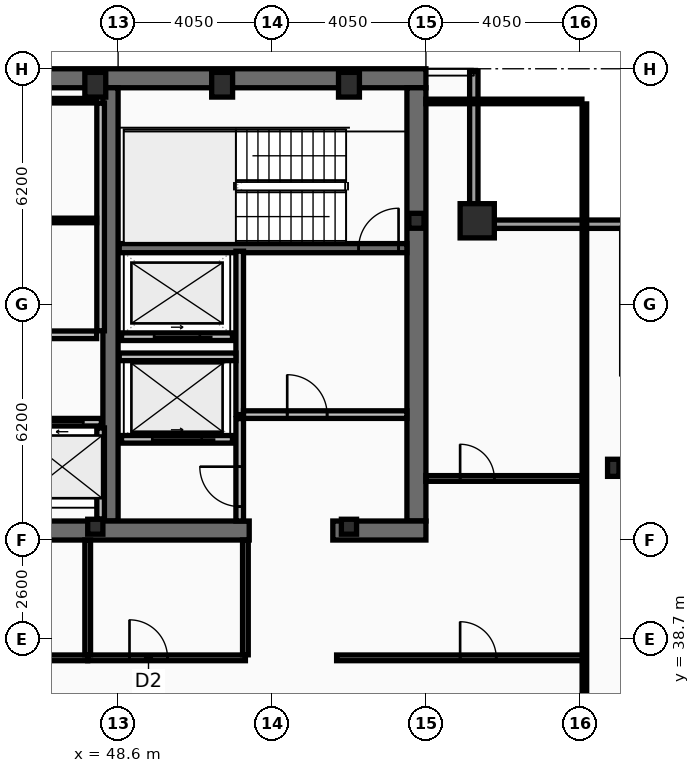
"""IFC4 building model, lengths in metres.
Left out: names, types, materials, properties, quantities, classifications, styles, units other than length and angle.
Written with IfcOpenShell. Run it as: python <this file> out.ifc"""

import sys

from ifc_helpers import new_model, si_unit, direction, frame, frame_2d, origin, origin_2d, place, context, subcontext, project, spatial, rectangle, hollow_rectangle, i_section, extrude, element, fill, save


model = new_model("IFC4")
c1 = context("Model", 3, precision=1e-05, world=origin(), true_north=direction((0.0, 1.0)))
c2 = subcontext(c1, "Body", "Model", "MODEL_VIEW")
j1 = project(units=[si_unit("LENGTHUNIT", "METRE"), si_unit("PLANEANGLEUNIT", "RADIAN")], contexts=[c1])
p1 = place(None, origin())
s1 = spatial("IfcSite", under=j1, at=p1, CompositionType="ELEMENT")
p2 = place(p1, origin())
s2 = spatial("IfcBuilding", under=s1, at=p2, CompositionType="ELEMENT")
p3 = place(p2, frame((0.0, 0.0, 332.6)))
s3 = spatial("IfcBuildingStorey", under=s2, at=p3, CompositionType="ELEMENT", Elevation=332.6)
p4 = place(p3, frame((16.2, 53.45, 0.0), z_axis=(0.0, 0.0, 1.0), x_axis=(1.0, 0.0, 0.0)))
e1 = element("IfcWall", 1, at=p4, inside=s3, PredefinedType="SHEAR", context=c2, shape_type="SweptSolid", body=[
    extrude(rectangle(XDim=40.5, YDim=0.5, at=frame_2d((20.25, 0.0))), origin(), (0.0, 0.0, 1.0), 3.44),
])
p5 = place(p3, frame((56.45, 53.2, 0.0), z_axis=(0.0, 0.0, 1.0), x_axis=(0.0, -1.0, 0.0)))
e2 = element("IfcWall", 2, at=p5, inside=s3, PredefinedType="SHEAR", context=c2, shape_type="SweptSolid", body=[
    extrude(rectangle(XDim=11.4, YDim=0.5, at=frame_2d((5.7, 0.0))), origin(), (0.0, 0.0, 1.0), 3.44),
])
p6 = place(p3, frame((48.4, 41.8, 0.0), z_axis=(0.0, 0.0, 1.0), x_axis=(0.0, 1.0, 0.0)))
e3 = element("IfcWall", 3, at=p6, inside=s3, PredefinedType="SHEAR", context=c2, shape_type="SweptSolid", body=[
    extrude(rectangle(XDim=11.4, YDim=0.4, at=frame_2d((5.7, 0.0))), origin(), (0.0, 0.0, 1.0), 3.44),
])
p7 = place(p3, frame((52.05, 41.55, 0.0), z_axis=(0.0, 0.0, 1.0), x_axis=(-1.0, 0.0, 0.0)))
e4 = element("IfcWall", 4, at=p7, inside=s3, PredefinedType="SHEAR", context=c2, shape_type="SweptSolid", body=[
    extrude(rectangle(XDim=11.3, YDim=0.5, at=frame_2d((5.65, 0.0))), origin(), (0.0, 0.0, 1.0), 3.44),
])
p8 = place(p3, frame((56.7, 41.55, 0.0), z_axis=(0.0, 0.0, 1.0), x_axis=(-1.0, 0.0, 0.0)))
e5 = element("IfcWall", 5, at=p8, inside=s3, PredefinedType="SHEAR", context=c2, shape_type="SweptSolid", body=[
    extrude(rectangle(XDim=2.45, YDim=0.5, at=frame_2d((1.225, 0.0))), origin(), (0.0, 0.0, 1.0), 3.44),
])
p9 = place(p3, frame((48.63, 48.98, 0.0), z_axis=(0.0, 0.0, 1.0), x_axis=(1.0, 0.0, 0.0)))
e6 = element("IfcWall", 6, at=p9, inside=s3, PredefinedType="SHEAR", context=c2, shape_type="SweptSolid", body=[
    extrude(rectangle(XDim=7.57, YDim=0.24, at=frame_2d((3.785, 0.0))), origin(), (0.0, 0.0, 1.0), 3.44),
])
p10 = place(p9, frame((6.3, 0.0, 0.0)))
e7 = element("IfcOpeningElement", 7, at=p10, cuts=e6, PredefinedType="OPENING", context=c2, shape_type="SweptSolid", body=[
    extrude(rectangle(XDim=1.05, YDim=2.15, at=frame_2d((0.525, 1.075))), frame((0.0, 0.13, 0.0), z_axis=(0.0, -1.0, 0.0), x_axis=(1.0, 0.0, 0.0)), (0.0, 0.0, 1.0), 0.26),
])
p11 = place(p3, frame((58.05, 49.7, 0.0), z_axis=(0.0, 0.0, 1.0), x_axis=(1.0, 0.0, 0.0)))
e8 = element("IfcColumn", 8, at=p11, inside=s3, PredefinedType="COLUMN", context=c2, shape_type="SweptSolid", body=[
    extrude(hollow_rectangle(XDim=0.9, YDim=0.9, WallThickness=0.05, at=origin_2d()), origin(), (0.0, 0.0, 1.0), 3.6),
])
for number, where, z_axis, x_axis in (
    (9, (48.0, 53.28, 0.0), (0.0, 0.0, 1.0), (1.0, 0.0, 0.0)),
    (10, (51.337, 53.28, 0.0), (0.0, 0.0, 1.0), (1.0, 0.0, 0.0)),
    (11, (54.675, 53.28, 0.0), (0.0, 0.0, 1.0), (1.0, 0.0, 0.0)),
):
    element("IfcColumn", number, at=place(p3, frame(where, z_axis=z_axis, x_axis=x_axis)), inside=s3, PredefinedType="COLUMN", context=c2, shape_type="SweptSolid", body=[
        extrude(hollow_rectangle(XDim=0.55, YDim=0.65, WallThickness=0.04, at=origin_2d()), origin(), (0.0, 0.0, 1.0), 3.6),
    ])
p12 = place(p3, frame((61.63, 43.2, 0.0), z_axis=(0.0, 0.0, 1.0), x_axis=(1.0, 0.0, 0.0)))
e12 = element("IfcColumn", 12, at=p12, inside=s3, PredefinedType="COLUMN", context=c2, shape_type="SweptSolid", body=[
    extrude(i_section(OverallWidth=0.3, OverallDepth=0.45, WebThickness=0.014, FlangeThickness=0.026, at=origin_2d()), origin(), (0.0, 0.0, 1.0), 3.6),
])
for number, where, z_axis, x_axis in (
    (13, (56.45, 49.7, 0.0), (0.0, 0.0, 1.0), (1.0, 0.0, 0.0)),
    (14, (48.0, 41.65, 0.0), (0.0, 0.0, 1.0), (1.0, 0.0, 0.0)),
    (15, (54.675, 41.65, 0.0), (0.0, 0.0, 1.0), (1.0, 0.0, 0.0)),
):
    element("IfcColumn", number, at=place(p3, frame(where, z_axis=z_axis, x_axis=x_axis)), inside=s3, PredefinedType="COLUMN", context=c2, shape_type="SweptSolid", body=[
        extrude(i_section(OverallWidth=0.399, OverallDepth=0.393, WebThickness=0.023, FlangeThickness=0.037, at=origin_2d()), origin(), (0.0, 0.0, 1.0), 3.6),
    ])
p13 = place(p3, frame((57.96, 53.63, 0.0), z_axis=(0.0, 0.0, 1.0), x_axis=(0.0, -1.0, 0.0)))
e16 = element("IfcWall", 16, at=p13, inside=s3, PredefinedType="SOLIDWALL", context=c2, shape_type="SweptSolid", body=[
    extrude(rectangle(XDim=3.91, YDim=0.22, at=frame_2d((1.955, 0.0))), origin(), (0.0, 0.0, 1.0), 2.88),
])
p14 = place(p3, frame((57.85, 49.61, 0.0), z_axis=(0.0, 0.0, 1.0), x_axis=(1.0, 0.0, 0.0)))
e17 = element("IfcWall", 17, at=p14, inside=s3, PredefinedType="SOLIDWALL", context=c2, shape_type="SweptSolid", body=[
    extrude(rectangle(XDim=4.22, YDim=0.22, at=frame_2d((2.11, 0.0))), origin(), (0.0, 0.0, 1.0), 2.88),
])
p15 = place(p3, frame((41.68, 44.4, 0.0), z_axis=(0.0, 0.0, 1.0), x_axis=(1.0, 0.0, 0.0)))
e18 = element("IfcWall", 18, at=p15, inside=s3, PredefinedType="PARTITIONING", context=c2, shape_type="SweptSolid", body=[
    extrude(rectangle(XDim=6.48, YDim=0.2, at=frame_2d((3.24, 0.0))), origin(), (0.0, 0.0, 1.0), 3.44),
])
p16 = place(p15, frame((0.58, 0.0, 0.0)))
e19 = element("IfcOpeningElement", 19, at=p16, cuts=e18, PredefinedType="OPENING", context=c2, shape_type="SweptSolid", body=[
    extrude(rectangle(XDim=1.1, YDim=2.18, at=frame_2d((0.55, 1.09))), frame((0.0, 0.11, 0.0), z_axis=(0.0, -1.0, 0.0), x_axis=(1.0, 0.0, 0.0)), (0.0, 0.0, 1.0), 0.22),
])
p17 = place(p15, frame((2.74, 0.0, 0.0)))
e20 = element("IfcOpeningElement", 20, at=p17, cuts=e18, PredefinedType="OPENING", context=c2, shape_type="SweptSolid", body=[
    extrude(rectangle(XDim=1.1, YDim=2.18, at=frame_2d((0.55, 1.09))), frame((0.0, 0.11, 0.0), z_axis=(0.0, -1.0, 0.0), x_axis=(1.0, 0.0, 0.0)), (0.0, 0.0, 1.0), 0.22),
])
p18 = place(p15, frame((4.9, 0.0, 0.0)))
e21 = element("IfcOpeningElement", 21, at=p18, cuts=e18, PredefinedType="OPENING", context=c2, shape_type="SweptSolid", body=[
    extrude(rectangle(XDim=1.1, YDim=2.18, at=frame_2d((0.55, 1.09))), frame((0.0, 0.11, 0.0), z_axis=(0.0, -1.0, 0.0), x_axis=(1.0, 0.0, 0.0)), (0.0, 0.0, 1.0), 0.22),
])
p19 = place(p3, frame((51.61, 43.95, 0.0), z_axis=(0.0, 0.0, 1.0), x_axis=(-1.0, 0.0, 0.0)))
e22 = element("IfcWall", 22, at=p19, inside=s3, PredefinedType="PARTITIONING", context=c2, shape_type="SweptSolid", body=[
    extrude(rectangle(XDim=2.92, YDim=0.2, at=frame_2d((1.46, 0.0))), origin(), (0.0, 0.0, 1.0), 3.44),
])
p20 = place(p19, frame((0.81, 0.0, 0.0)))
e23 = element("IfcOpeningElement", 23, at=p20, cuts=e22, PredefinedType="OPENING", context=c2, shape_type="SweptSolid", body=[
    extrude(rectangle(XDim=1.3, YDim=2.18, at=frame_2d((0.65, 1.09))), frame((0.0, 0.11, 0.0), z_axis=(0.0, -1.0, 0.0), x_axis=(1.0, 0.0, 0.0)), (0.0, 0.0, 1.0), 0.22),
])
p21 = place(p3, frame((51.61, 46.65, 0.0), z_axis=(0.0, 0.0, 1.0), x_axis=(-1.0, 0.0, 0.0)))
e24 = element("IfcWall", 24, at=p21, inside=s3, PredefinedType="PARTITIONING", context=c2, shape_type="SweptSolid", body=[
    extrude(rectangle(XDim=2.92, YDim=0.2, at=frame_2d((1.46, 0.0))), origin(), (0.0, 0.0, 1.0), 3.44),
])
p22 = place(p21, frame((0.86, 0.0, 0.0)))
e25 = element("IfcOpeningElement", 25, at=p22, cuts=e24, PredefinedType="OPENING", context=c2, shape_type="SweptSolid", body=[
    extrude(rectangle(XDim=1.2, YDim=2.18, at=frame_2d((0.6, 1.09))), frame((0.0, 0.11, 0.0), z_axis=(0.0, -1.0, 0.0), x_axis=(1.0, 0.0, 0.0)), (0.0, 0.0, 1.0), 0.22),
])
p23 = place(p3, frame((51.8, 44.6, 0.0), z_axis=(0.0, 0.0, 1.0), x_axis=(0.0, 1.0, 0.0)))
e26 = element("IfcWall", 26, at=p23, inside=s3, PredefinedType="PARTITIONING", context=c2, shape_type="SweptSolid", body=[
    extrude(rectangle(XDim=4.3, YDim=0.2, at=frame_2d((2.15, 0.0))), origin(), (0.0, 0.0, 1.0), 3.44),
])
p24 = place(p3, frame((51.9, 44.6, 0.0), z_axis=(0.0, 0.0, 1.0), x_axis=(1.0, 0.0, 0.0)))
e27 = element("IfcWall", 27, at=p24, inside=s3, PredefinedType="PARTITIONING", context=c2, shape_type="SweptSolid", body=[
    extrude(rectangle(XDim=4.3, YDim=0.2, at=frame_2d((2.15, 0.0))), origin(), (0.0, 0.0, 1.0), 3.44),
])
p25 = place(p24, frame((1.15, 0.0, 0.0)))
e28 = element("IfcOpeningElement", 28, at=p25, cuts=e27, PredefinedType="OPENING", context=c2, shape_type="SweptSolid", body=[
    extrude(rectangle(XDim=1.05, YDim=2.15, at=frame_2d((0.525, 1.075))), frame((0.0, 0.11, 0.0), z_axis=(0.0, -1.0, 0.0), x_axis=(1.0, 0.0, 0.0)), (0.0, 0.0, 1.0), 0.22),
])
p26 = place(p3, frame((48.63, 46.12, 0.0), z_axis=(0.0, 0.0, 1.0), x_axis=(1.0, 0.0, 0.0)))
e29 = element("IfcWall", 29, at=p26, inside=s3, PredefinedType="PARTITIONING", context=c2, shape_type="SweptSolid", body=[
    extrude(rectangle(XDim=3.07, YDim=0.2, at=frame_2d((1.535, 0.0))), origin(), (0.0, 0.0, 1.0), 3.44),
])
p27 = place(p3, frame((51.8, 41.8, 0.0), z_axis=(0.0, 0.0, 1.0), x_axis=(0.0, 1.0, 0.0)))
e30 = element("IfcWall", 30, at=p27, inside=s3, PredefinedType="PARTITIONING", context=c2, shape_type="SweptSolid", body=[
    extrude(rectangle(XDim=2.695, YDim=0.2, at=frame_2d((1.348, 0.0))), origin(), (0.0, 0.0, 1.0), 3.44),
])
p28 = place(p27, frame((0.38, 0.0, 0.0)))
e31 = element("IfcOpeningElement", 31, at=p28, cuts=e30, PredefinedType="OPENING", context=c2, shape_type="SweptSolid", body=[
    extrude(rectangle(XDim=1.05, YDim=2.15, at=frame_2d((0.525, 1.075))), frame((0.0, 0.11, 0.0), z_axis=(0.0, -1.0, 0.0), x_axis=(1.0, 0.0, 0.0)), (0.0, 0.0, 1.0), 0.22),
])
p29 = place(p3, frame((48.14, 46.805, 0.0), z_axis=(0.0, 0.0, 1.0), x_axis=(0.0, 1.0, 0.0)))
e32 = element("IfcWall", 32, at=p29, inside=s3, PredefinedType="PARTITIONING", context=c2, shape_type="SweptSolid", body=[
    extrude(rectangle(XDim=5.99, YDim=0.2, at=frame_2d((2.995, 0.0))), origin(), (0.0, 0.0, 1.0), 3.44),
])
p30 = place(p3, frame((40.685, 52.86, 0.0), z_axis=(0.0, 0.0, 1.0), x_axis=(1.0, 0.0, 0.0)))
e33 = element("IfcWall", 33, at=p30, inside=s3, PredefinedType="PARTITIONING", context=c2, shape_type="SweptSolid", body=[
    extrude(rectangle(XDim=7.35, YDim=0.12, at=frame_2d((3.675, 0.0))), origin(), (0.0, 0.0, 1.0), 3.44),
])
p31 = place(p3, frame((40.685, 49.709, 0.0), z_axis=(0.0, 0.0, 1.0), x_axis=(1.0, 0.0, 0.0)))
e34 = element("IfcWall", 34, at=p31, inside=s3, PredefinedType="PARTITIONING", context=c2, shape_type="SweptSolid", body=[
    extrude(rectangle(XDim=7.35, YDim=0.12, at=frame_2d((3.675, 0.0))), origin(), (0.0, 0.0, 1.0), 3.44),
])
p32 = place(p31, frame((2.4, 0.0, 0.0)))
e35 = element("IfcOpeningElement", 35, at=p32, cuts=e34, PredefinedType="OPENING", context=c2, shape_type="SweptSolid", body=[
    extrude(rectangle(XDim=0.9, YDim=2.05, at=frame_2d((0.45, 1.025))), frame((0.0, 0.07, 0.0), z_axis=(0.0, -1.0, 0.0), x_axis=(1.0, 0.0, 0.0)), (0.0, 0.0, 1.0), 0.14),
])
p33 = place(p3, frame((40.685, 46.7, 0.0), z_axis=(0.0, 0.0, 1.0), x_axis=(1.0, 0.0, 0.0)))
e36 = element("IfcWall", 36, at=p33, inside=s3, PredefinedType="PARTITIONING", context=c2, shape_type="SweptSolid", body=[
    extrude(rectangle(XDim=7.35, YDim=0.2, at=frame_2d((3.675, 0.0))), origin(), (0.0, 0.0, 1.0), 3.44),
])
p34 = place(p33, frame((2.4, 0.0, 0.0)))
e37 = element("IfcOpeningElement", 37, at=p34, cuts=e36, PredefinedType="OPENING", context=c2, shape_type="SweptSolid", body=[
    extrude(rectangle(XDim=0.95, YDim=2.1, at=frame_2d((0.475, 1.05))), frame((0.0, 0.11, 0.0), z_axis=(0.0, -1.0, 0.0), x_axis=(1.0, 0.0, 0.0)), (0.0, 0.0, 1.0), 0.22),
])
p35 = place(p3, frame((48.14, 41.85, 0.0), z_axis=(0.0, 0.0, 1.0), x_axis=(0.0, 1.0, 0.0)))
e38 = element("IfcWall", 38, at=p35, inside=s3, PredefinedType="PARTITIONING", context=c2, shape_type="SweptSolid", body=[
    extrude(rectangle(XDim=2.4, YDim=0.2, at=frame_2d((1.2, 0.0))), origin(), (0.0, 0.0, 1.0), 3.44),
])
p36 = place(p3, frame((40.88, 38.2, 0.0), z_axis=(0.0, 0.0, 1.0), x_axis=(1.0, 0.0, 0.0)))
e39 = element("IfcWall", 39, at=p36, inside=s3, PredefinedType="PARTITIONING", context=c2, shape_type="SweptSolid", body=[
    extrude(rectangle(XDim=6.92, YDim=0.15, at=frame_2d((3.46, 0.0))), origin(), (0.0, 0.0, 1.0), 2.83),
])
p37 = place(p36, frame((1.1, 0.0, 0.0)))
e40 = element("IfcOpeningElement", 40, at=p37, cuts=e39, PredefinedType="OPENING", context=c2, shape_type="SweptSolid", body=[
    extrude(rectangle(XDim=0.9, YDim=2.05, at=frame_2d((0.45, 1.025))), frame((0.0, 0.085, 0.0), z_axis=(0.0, -1.0, 0.0), x_axis=(1.0, 0.0, 0.0)), (0.0, 0.0, 1.0), 0.17),
])
p38 = place(p3, frame((47.8, 38.2, 0.0), z_axis=(0.0, 0.0, 1.0), x_axis=(1.0, 0.0, 0.0)))
e41 = element("IfcWall", 41, at=p38, inside=s3, PredefinedType="PARTITIONING", context=c2, shape_type="SweptSolid", body=[
    extrude(rectangle(XDim=4.15, YDim=0.15, at=frame_2d((2.075, 0.0))), origin(), (0.0, 0.0, 1.0), 2.83),
])
p39 = place(p38, frame((1.1, 0.0, 0.0)))
e42 = element("IfcOpeningElement", 42, at=p39, cuts=e41, PredefinedType="OPENING", context=c2, shape_type="SweptSolid", body=[
    extrude(rectangle(XDim=1.0, YDim=2.05, at=frame_2d((0.5, 1.025))), frame((0.0, 0.085, 0.0), z_axis=(0.0, -1.0, 0.0), x_axis=(1.0, 0.0, 0.0)), (0.0, 0.0, 1.0), 0.17),
])
p40 = place(p3, frame((47.8, 38.28, 0.0), z_axis=(0.0, 0.0, 1.0), x_axis=(0.0, 1.0, 0.0)))
e43 = element("IfcWall", 43, at=p40, inside=s3, PredefinedType="PARTITIONING", context=c2, shape_type="SweptSolid", body=[
    extrude(rectangle(XDim=3.02, YDim=0.15, at=frame_2d((1.51, 0.0))), origin(), (0.0, 0.0, 1.0), 2.83),
])
p41 = place(p3, frame((51.95, 38.28, 0.0), z_axis=(0.0, 0.0, 1.0), x_axis=(0.0, 1.0, 0.0)))
e44 = element("IfcWall", 44, at=p41, inside=s3, PredefinedType="PARTITIONING", context=c2, shape_type="SweptSolid", body=[
    extrude(rectangle(XDim=3.02, YDim=0.15, at=frame_2d((1.51, 0.0))), origin(), (0.0, 0.0, 1.0), 3.44),
])
p42 = place(p3, frame((54.35, 38.2, 0.0), z_axis=(0.0, 0.0, 1.0), x_axis=(1.0, 0.0, 0.0)))
e45 = element("IfcWall", 45, at=p42, inside=s3, PredefinedType="PARTITIONING", context=c2, shape_type="SweptSolid", body=[
    extrude(rectangle(XDim=6.52, YDim=0.15, at=frame_2d((3.26, 0.0))), origin(), (0.0, 0.0, 1.0), 2.83),
])
p43 = place(p42, frame((3.25, 0.0, 0.0)))
e46 = element("IfcOpeningElement", 46, at=p43, cuts=e45, PredefinedType="OPENING", context=c2, shape_type="SweptSolid", body=[
    extrude(rectangle(XDim=0.95, YDim=2.05, at=frame_2d((0.475, 1.025))), frame((0.0, 0.085, 0.0), z_axis=(0.0, -1.0, 0.0), x_axis=(1.0, 0.0, 0.0)), (0.0, 0.0, 1.0), 0.17),
])
p44 = place(p3, frame((56.7, 42.92, 0.0), z_axis=(0.0, 0.0, 1.0), x_axis=(1.0, 0.0, 0.0)))
e47 = element("IfcWall", 47, at=p44, inside=s3, PredefinedType="PARTITIONING", context=c2, shape_type="SweptSolid", body=[
    extrude(rectangle(XDim=4.105, YDim=0.15, at=frame_2d((2.052, 0.0))), origin(), (0.0, 0.0, 1.0), 2.83),
])
p45 = place(p44, frame((0.9, 0.0, 0.0)))
e48 = element("IfcOpeningElement", 48, at=p45, cuts=e47, PredefinedType="OPENING", context=c2, shape_type="SweptSolid", body=[
    extrude(rectangle(XDim=0.9, YDim=2.05, at=frame_2d((0.45, 1.025))), frame((0.0, 0.085, 0.0), z_axis=(0.0, -1.0, 0.0), x_axis=(1.0, 0.0, 0.0)), (0.0, 0.0, 1.0), 0.17),
])
p46 = place(p3, frame((60.87, 10.665, 0.0), z_axis=(0.0, 0.0, 1.0), x_axis=(0.0, 1.0, 0.0)))
e49 = element("IfcWall", 49, at=p46, inside=s3, PredefinedType="PARTITIONING", context=c2, shape_type="SweptSolid", body=[
    extrude(rectangle(XDim=42.11, YDim=0.12, at=frame_2d((21.055, 0.0))), origin(), (0.0, 0.0, 1.0), 2.83),
])
p47 = place(p3, frame((56.7, 52.84, 0.0), z_axis=(0.0, 0.0, 1.0), x_axis=(1.0, 0.0, 0.0)))
e50 = element("IfcWall", 50, at=p47, inside=s3, PredefinedType="PARTITIONING", context=c2, shape_type="SweptSolid", body=[
    extrude(rectangle(XDim=4.105, YDim=0.12, at=frame_2d((2.052, 0.0))), origin(), (0.0, 0.0, 1.0), 3.44),
])
p48 = place(p10, origin())
e51 = element("IfcDoor", 51, at=p48, inside=s3, OperationType="SINGLE_SWING_RIGHT", PredefinedType="DOOR", context=c2, shape_type="SweptSolid", body=[
    extrude(rectangle(XDim=1.05, YDim=2.15, at=frame_2d((0.525, 1.075))), frame((0.0, 0.025, 0.0), z_axis=(0.0, -1.0, 0.0), x_axis=(1.0, 0.0, 0.0)), (0.0, 0.0, 1.0), 0.05),
])
fill(e7, e51)
p49 = place(p18, origin())
e52 = element("IfcDoor", 52, at=p49, inside=s3, OperationType="SLIDING_TO_LEFT", PredefinedType="DOOR", context=c2, shape_type="SweptSolid", body=[
    extrude(rectangle(XDim=1.1, YDim=2.18, at=frame_2d((0.55, 1.09))), frame((0.0, 0.025, 0.0), z_axis=(0.0, -1.0, 0.0), x_axis=(1.0, 0.0, 0.0)), (0.0, 0.0, 1.0), 0.05),
])
fill(e21, e52)
p50 = place(p20, origin())
e53 = element("IfcDoor", 53, at=p50, inside=s3, OperationType="SLIDING_TO_LEFT", PredefinedType="DOOR", context=c2, shape_type="SweptSolid", body=[
    extrude(rectangle(XDim=1.3, YDim=2.18, at=frame_2d((0.65, 1.09))), frame((0.0, 0.025, 0.0), z_axis=(0.0, -1.0, 0.0), x_axis=(1.0, 0.0, 0.0)), (0.0, 0.0, 1.0), 0.05),
])
fill(e23, e53)
p51 = place(p22, origin())
e54 = element("IfcDoor", 54, at=p51, inside=s3, OperationType="SLIDING_TO_LEFT", PredefinedType="DOOR", context=c2, shape_type="SweptSolid", body=[
    extrude(rectangle(XDim=1.2, YDim=2.18, at=frame_2d((0.6, 1.09))), frame((0.0, 0.025, 0.0), z_axis=(0.0, -1.0, 0.0), x_axis=(1.0, 0.0, 0.0)), (0.0, 0.0, 1.0), 0.05),
])
fill(e25, e54)
p52 = place(p25, origin())
e55 = element("IfcDoor", 55, at=p52, inside=s3, OperationType="SINGLE_SWING_LEFT", PredefinedType="DOOR", context=c2, shape_type="SweptSolid", body=[
    extrude(rectangle(XDim=1.05, YDim=2.15, at=frame_2d((0.525, 1.075))), frame((0.0, 0.025, 0.0), z_axis=(0.0, -1.0, 0.0), x_axis=(1.0, 0.0, 0.0)), (0.0, 0.0, 1.0), 0.05),
])
fill(e28, e55)
p53 = place(p28, origin())
e56 = element("IfcDoor", 56, at=p53, inside=s3, OperationType="SINGLE_SWING_RIGHT", PredefinedType="DOOR", context=c2, shape_type="SweptSolid", body=[
    extrude(rectangle(XDim=1.05, YDim=2.15, at=frame_2d((0.525, 1.075))), frame((0.0, 0.025, 0.0), z_axis=(0.0, -1.0, 0.0), x_axis=(1.0, 0.0, 0.0)), (0.0, 0.0, 1.0), 0.05),
])
fill(e31, e56)
p54 = place(p39, origin())
e57 = element("IfcDoor", 57, at=p54, inside=s3, OperationType="SINGLE_SWING_LEFT", PredefinedType="DOOR", context=c2, shape_type="SweptSolid", body=[
    extrude(rectangle(XDim=1.0, YDim=2.05, at=frame_2d((0.5, 1.025))), frame((0.0, 0.025, 0.0), z_axis=(0.0, -1.0, 0.0), x_axis=(1.0, 0.0, 0.0)), (0.0, 0.0, 1.0), 0.05),
])
fill(e42, e57)
p55 = place(p43, origin())
e58 = element("IfcDoor", 58, at=p55, inside=s3, OperationType="SINGLE_SWING_LEFT", PredefinedType="DOOR", context=c2, shape_type="SweptSolid", body=[
    extrude(rectangle(XDim=0.95, YDim=2.05, at=frame_2d((0.475, 1.025))), frame((0.0, 0.025, 0.0), z_axis=(0.0, -1.0, 0.0), x_axis=(1.0, 0.0, 0.0)), (0.0, 0.0, 1.0), 0.05),
])
fill(e46, e58)
p56 = place(p45, origin())
e59 = element("IfcDoor", 59, at=p56, inside=s3, OperationType="SINGLE_SWING_LEFT", PredefinedType="DOOR", context=c2, shape_type="SweptSolid", body=[
    extrude(rectangle(XDim=0.9, YDim=2.05, at=frame_2d((0.45, 1.025))), frame((0.0, 0.025, 0.0), z_axis=(0.0, -1.0, 0.0), x_axis=(1.0, 0.0, 0.0)), (0.0, 0.0, 1.0), 0.05),
])
fill(e48, e59)
save(model, sys.argv[1])
